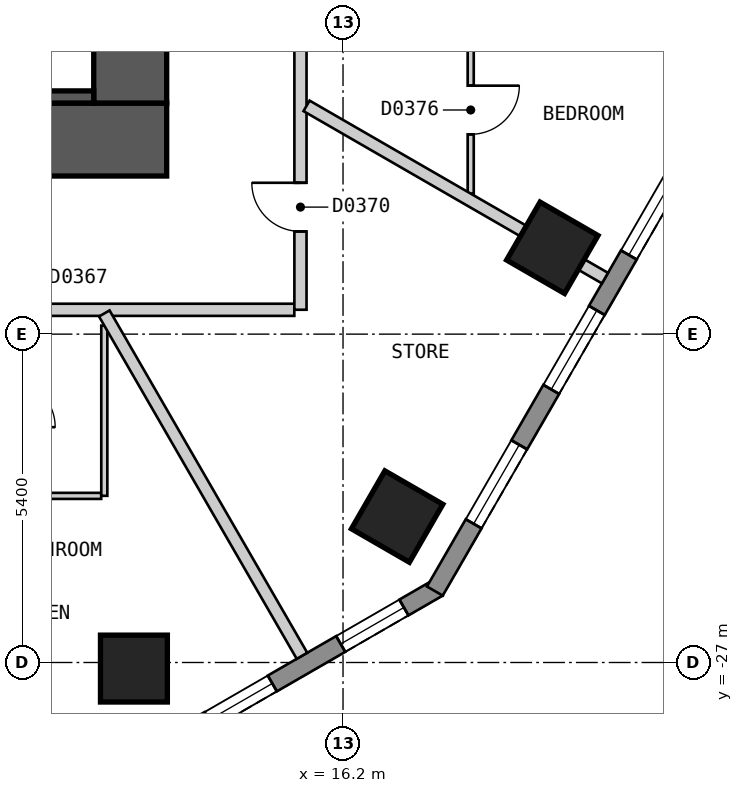
"""IFC4 building model, lengths in metres.
Left out: names, types, materials, properties, quantities, classifications, styles, units other than length and angle.
Written with IfcOpenShell. Run it as: python <this file> out.ifc"""

import sys

from ifc_helpers import new_model, si_unit, direction, frame, frame_2d, origin, origin_2d, place, context, subcontext, project, spatial, polyline, rectangle, outline, extrude, element, fill, save


model = new_model("IFC4")
c1 = context("Model", 3, precision=1e-05, world=origin(), true_north=direction((0.0, 1.0)))
c2 = subcontext(c1, "Body", "Model", "MODEL_VIEW")
j1 = project(units=[si_unit("LENGTHUNIT", "METRE"), si_unit("PLANEANGLEUNIT", "RADIAN")], contexts=[c1])
p1 = place(None, origin())
s1 = spatial("IfcSite", under=j1, at=p1, CompositionType="ELEMENT")
p2 = place(p1, origin())
s2 = spatial("IfcBuilding", under=s1, at=p2, CompositionType="ELEMENT")
p3 = place(p2, frame((0.0, 0.0, 59.4)))
s3 = spatial("IfcBuildingStorey", under=s2, at=p3, CompositionType="ELEMENT", Elevation=59.4)
for number, where, z_axis, x_axis in (
    (1, (12.761, -27.1, 0.0), (0.0, 0.0, 1.0), (1.0, 0.0, 0.0)),
    (2, (17.09, -24.6, 0.0), (0.0, 0.0, 1.0), (0.5, 0.866, 0.0)),
    (3, (19.642, -20.18, 0.0), (0.0, 0.0, 1.0), (0.5, 0.866, 0.0)),
):
    element("IfcColumn", number, at=place(p3, frame(where, z_axis=z_axis, x_axis=x_axis)), inside=s3, PredefinedType="COLUMN", context=c2, shape_type="SweptSolid", body=[
        extrude(rectangle(XDim=1.1, YDim=1.1, at=origin_2d()), origin(), (0.0, 0.0, 1.0), 3.0),
    ])
p4 = place(p3, frame((-13.3, -18.4, 0.0), z_axis=(0.0, 0.0, 1.0), x_axis=(1.0, 0.0, 0.0)))
e4 = element("IfcWall", 4, at=p4, inside=s3, PredefinedType="SHEAR", context=c2, shape_type="SweptSolid", body=[
    extrude(rectangle(XDim=26.6, YDim=1.2, at=frame_2d((13.3, 0.0))), origin(), (0.0, 0.0, 1.0), 2.6),
])
p5 = place(p3, frame((12.7, -17.8, 0.0), z_axis=(0.0, 0.0, 1.0), x_axis=(0.0, 1.0, 0.0)))
e5 = element("IfcWall", 5, at=p5, inside=s3, PredefinedType="SHEAR", context=c2, shape_type="SweptSolid", body=[
    extrude(rectangle(XDim=11.6, YDim=1.2, at=frame_2d((5.8, 0.0))), origin(), (0.0, 0.0, 1.0), 2.6),
])
p6 = place(p3, frame((13.435, -28.27, 0.0), z_axis=(0.0, 0.0, 1.0), x_axis=(0.866010750942, 0.50002537861, 0.0)))
e6 = element("IfcWall", 6, at=p6, inside=s3, PredefinedType="SOLIDWALL", context=c2, shape_type="SweptSolid", body=[
    extrude(outline(polyline([(0.0, -0.15), (5.0, -0.15), (4.919, 0.15), (0.08, 0.15), (0.0, -0.15)])), origin(), (0.0, 0.0, 1.0), 2.6),
])
p7 = place(p6, frame((0.65, 0.0, 0.15)))
e7 = element("IfcOpeningElement", 7, at=p7, cuts=e6, PredefinedType="OPENING", context=c2, shape_type="SweptSolid", body=[
    extrude(rectangle(XDim=1.2, YDim=2.1, at=frame_2d((0.6, 1.05))), frame((0.0, 0.16, 0.0), z_axis=(0.0, -1.0, 0.0), x_axis=(1.0, 0.0, 0.0)), (0.0, 0.0, 1.0), 0.32),
])
p8 = place(p6, frame((3.149, 0.0, 0.15)))
e8 = element("IfcOpeningElement", 8, at=p8, cuts=e6, PredefinedType="OPENING", context=c2, shape_type="SweptSolid", body=[
    extrude(rectangle(XDim=1.2, YDim=2.1, at=frame_2d((0.6, 1.05))), frame((0.0, 0.16, 0.0), z_axis=(0.0, -1.0, 0.0), x_axis=(1.0, 0.0, 0.0)), (0.0, 0.0, 1.0), 0.32),
])
p9 = place(p3, frame((17.71, -25.825, 0.0), z_axis=(0.0, 0.0, 1.0), x_axis=(0.500001938803, 0.866024284413, 0.0)))
e9 = element("IfcWall", 9, at=p9, inside=s3, PredefinedType="SOLIDWALL", context=c2, shape_type="SweptSolid", body=[
    extrude(outline(polyline([(0.0, -0.15), (27.02, -0.15), (26.94, 0.15), (0.08, 0.15), (0.0, -0.15)])), origin(), (0.0, 0.0, 1.0), 2.6),
])
p10 = place(p9, frame((1.277, 0.0, 0.15)))
e10 = element("IfcOpeningElement", 10, at=p10, cuts=e9, PredefinedType="OPENING", context=c2, shape_type="SweptSolid", body=[
    extrude(rectangle(XDim=1.5, YDim=2.1, at=frame_2d((0.75, 1.05))), frame((0.0, 0.16, 0.0), z_axis=(0.0, -1.0, 0.0), x_axis=(1.0, 0.0, 0.0)), (0.0, 0.0, 1.0), 0.32),
])
p11 = place(p9, frame((3.829, 0.0, 0.15)))
e11 = element("IfcOpeningElement", 11, at=p11, cuts=e9, PredefinedType="OPENING", context=c2, shape_type="SweptSolid", body=[
    extrude(rectangle(XDim=1.5, YDim=2.1, at=frame_2d((0.75, 1.05))), frame((0.0, 0.16, 0.0), z_axis=(0.0, -1.0, 0.0), x_axis=(1.0, 0.0, 0.0)), (0.0, 0.0, 1.0), 0.32),
])
p12 = place(p9, frame((6.382, 0.0, 0.15)))
e12 = element("IfcOpeningElement", 12, at=p12, cuts=e9, PredefinedType="OPENING", context=c2, shape_type="SweptSolid", body=[
    extrude(rectangle(XDim=1.5, YDim=2.1, at=frame_2d((0.75, 1.05))), frame((0.0, 0.16, 0.0), z_axis=(0.0, -1.0, 0.0), x_axis=(1.0, 0.0, 0.0)), (0.0, 0.0, 1.0), 0.32),
])
p13 = place(p9, frame((8.933, 0.0, 0.15)))
e13 = element("IfcOpeningElement", 13, at=p13, cuts=e9, PredefinedType="OPENING", context=c2, shape_type="SweptSolid", body=[
    extrude(rectangle(XDim=1.5, YDim=2.1, at=frame_2d((0.75, 1.05))), frame((0.0, 0.16, 0.0), z_axis=(0.0, -1.0, 0.0), x_axis=(1.0, 0.0, 0.0)), (0.0, 0.0, 1.0), 0.32),
])
p14 = place(p9, frame((11.485, 0.0, 0.15)))
e14 = element("IfcOpeningElement", 14, at=p14, cuts=e9, PredefinedType="OPENING", context=c2, shape_type="SweptSolid", body=[
    extrude(rectangle(XDim=1.5, YDim=2.1, at=frame_2d((0.75, 1.05))), frame((0.0, 0.16, 0.0), z_axis=(0.0, -1.0, 0.0), x_axis=(1.0, 0.0, 0.0)), (0.0, 0.0, 1.0), 0.32),
])
p15 = place(p9, frame((14.037, 0.0, 0.15)))
e15 = element("IfcOpeningElement", 15, at=p15, cuts=e9, PredefinedType="OPENING", context=c2, shape_type="SweptSolid", body=[
    extrude(rectangle(XDim=1.5, YDim=2.1, at=frame_2d((0.75, 1.05))), frame((0.0, 0.16, 0.0), z_axis=(0.0, -1.0, 0.0), x_axis=(1.0, 0.0, 0.0)), (0.0, 0.0, 1.0), 0.32),
])
p16 = place(p9, frame((16.589, 0.0, 0.15)))
e16 = element("IfcOpeningElement", 16, at=p16, cuts=e9, PredefinedType="OPENING", context=c2, shape_type="SweptSolid", body=[
    extrude(rectangle(XDim=1.5, YDim=2.1, at=frame_2d((0.75, 1.05))), frame((0.0, 0.16, 0.0), z_axis=(0.0, -1.0, 0.0), x_axis=(1.0, 0.0, 0.0)), (0.0, 0.0, 1.0), 0.32),
])
p17 = place(p9, frame((19.141, 0.0, 0.15)))
e17 = element("IfcOpeningElement", 17, at=p17, cuts=e9, PredefinedType="OPENING", context=c2, shape_type="SweptSolid", body=[
    extrude(rectangle(XDim=1.5, YDim=2.1, at=frame_2d((0.75, 1.05))), frame((0.0, 0.16, 0.0), z_axis=(0.0, -1.0, 0.0), x_axis=(1.0, 0.0, 0.0)), (0.0, 0.0, 1.0), 0.32),
])
p18 = place(p9, frame((21.693, 0.0, 0.15)))
e18 = element("IfcOpeningElement", 18, at=p18, cuts=e9, PredefinedType="OPENING", context=c2, shape_type="SweptSolid", body=[
    extrude(rectangle(XDim=1.5, YDim=2.1, at=frame_2d((0.75, 1.05))), frame((0.0, 0.16, 0.0), z_axis=(0.0, -1.0, 0.0), x_axis=(1.0, 0.0, 0.0)), (0.0, 0.0, 1.0), 0.32),
])
p19 = place(p9, frame((24.244, 0.0, 0.15)))
e19 = element("IfcOpeningElement", 19, at=p19, cuts=e9, PredefinedType="OPENING", context=c2, shape_type="SweptSolid", body=[
    extrude(rectangle(XDim=1.5, YDim=2.1, at=frame_2d((0.75, 1.05))), frame((0.0, 0.16, 0.0), z_axis=(0.0, -1.0, 0.0), x_axis=(1.0, 0.0, 0.0)), (0.0, 0.0, 1.0), 0.32),
])
p20 = place(p3, frame((-15.4, -21.2, 0.0), z_axis=(0.0, 0.0, 1.0), x_axis=(1.0, 0.0, 0.0)))
e20 = element("IfcWall", 20, at=p20, inside=s3, PredefinedType="PARTITIONING", context=c2, shape_type="SweptSolid", body=[
    extrude(rectangle(XDim=30.799, YDim=0.2, at=frame_2d((15.399, 0.0))), origin(), (0.0, 0.0, 1.0), 2.6),
])
p21 = place(p20, frame((9.797, 0.0, 0.0)))
e21 = element("IfcOpeningElement", 21, at=p21, cuts=e20, PredefinedType="OPENING", context=c2, shape_type="SweptSolid", body=[
    extrude(rectangle(XDim=1.0, YDim=2.1, at=frame_2d((0.5, 1.05))), frame((0.0, 0.11, 0.0), z_axis=(0.0, -1.0, 0.0), x_axis=(1.0, 0.0, 0.0)), (0.0, 0.0, 1.0), 0.22),
])
p22 = place(p20, frame((14.901, 0.0, 0.0)))
e22 = element("IfcOpeningElement", 22, at=p22, cuts=e20, PredefinedType="OPENING", context=c2, shape_type="SweptSolid", body=[
    extrude(rectangle(XDim=1.0, YDim=2.1, at=frame_2d((0.5, 1.05))), frame((0.0, 0.11, 0.0), z_axis=(0.0, -1.0, 0.0), x_axis=(1.0, 0.0, 0.0)), (0.0, 0.0, 1.0), 0.22),
])
p23 = place(p20, frame((24.916, 0.0, 0.0)))
e23 = element("IfcOpeningElement", 23, at=p23, cuts=e20, PredefinedType="OPENING", context=c2, shape_type="SweptSolid", body=[
    extrude(rectangle(XDim=0.9, YDim=2.1, at=frame_2d((0.45, 1.05))), frame((0.0, 0.11, 0.0), z_axis=(0.0, -1.0, 0.0), x_axis=(1.0, 0.0, 0.0)), (0.0, 0.0, 1.0), 0.22),
])
p24 = place(p3, frame((15.5, -21.199, 0.0), z_axis=(0.0, 0.0, 1.0), x_axis=(0.0, 1.0, 0.0)))
e24 = element("IfcWall", 24, at=p24, inside=s3, PredefinedType="PARTITIONING", context=c2, shape_type="SweptSolid", body=[
    extrude(rectangle(XDim=7.575, YDim=0.2, at=frame_2d((3.788, 0.0))), origin(), (0.0, 0.0, 1.0), 2.6),
])
p25 = place(p24, frame((1.288, 0.0, 0.0)))
e25 = element("IfcOpeningElement", 25, at=p25, cuts=e24, PredefinedType="OPENING", context=c2, shape_type="SweptSolid", body=[
    extrude(rectangle(XDim=0.8, YDim=2.1, at=frame_2d((0.4, 1.05))), frame((0.0, 0.11, 0.0), z_axis=(0.0, -1.0, 0.0), x_axis=(1.0, 0.0, 0.0)), (0.0, 0.0, 1.0), 0.22),
])
p26 = place(p3, frame((9.267, -24.26, 0.0), z_axis=(0.0, 0.0, 1.0), x_axis=(1.0, 0.0, 0.0)))
e26 = element("IfcWall", 26, at=p26, inside=s3, PredefinedType="PARTITIONING", context=c2, shape_type="SweptSolid", body=[
    extrude(rectangle(XDim=2.956, YDim=0.1, at=frame_2d((1.478, 0.0))), origin(), (0.0, 0.0, 1.0), 2.6),
])
p27 = place(p3, frame((12.274, -24.259, 0.0), z_axis=(0.0, 0.0, 1.0), x_axis=(0.0, 1.0, 0.0)))
e27 = element("IfcWall", 27, at=p27, inside=s3, PredefinedType="PARTITIONING", context=c2, shape_type="SweptSolid", body=[
    extrude(rectangle(XDim=2.799, YDim=0.1, at=frame_2d((1.399, 0.0))), origin(), (0.0, 0.0, 1.0), 2.6),
])
p28 = place(p3, frame((18.3, -19.289, 0.0), z_axis=(0.0, 0.0, 1.0), x_axis=(0.0, 1.0, 0.0)))
e28 = element("IfcWall", 28, at=p28, inside=s3, PredefinedType="PARTITIONING", context=c2, shape_type="SweptSolid", body=[
    extrude(rectangle(XDim=2.865, YDim=0.1, at=frame_2d((1.433, 0.0))), origin(), (0.0, 0.0, 1.0), 2.6),
])
p29 = place(p28, frame((0.975, 0.0, 0.0)))
e29 = element("IfcOpeningElement", 29, at=p29, cuts=e28, PredefinedType="OPENING", context=c2, shape_type="SweptSolid", body=[
    extrude(rectangle(XDim=0.8, YDim=2.1, at=frame_2d((0.4, 1.05))), frame((0.0, 0.06, 0.0), z_axis=(0.0, -1.0, 0.0), x_axis=(1.0, 0.0, 0.0)), (0.0, 0.0, 1.0), 0.12),
])
p30 = place(p3, frame((12.274, -21.26, 0.0), z_axis=(0.0, 0.0, 1.0), x_axis=(0.500064857354, -0.865987955135, 0.0)))
e30 = element("IfcWall", 30, at=p30, inside=s3, PredefinedType="PARTITIONING", context=c2, shape_type="SweptSolid", body=[
    extrude(rectangle(XDim=6.501, YDim=0.2, at=frame_2d((3.25, 0.0))), origin(), (0.0, 0.0, 1.0), 2.6),
])
p31 = place(p3, frame((15.6, -17.846, 0.0), z_axis=(0.0, 0.0, 1.0), x_axis=(0.866071523686, -0.499920109479, 0.0)))
e31 = element("IfcWall", 31, at=p31, inside=s3, PredefinedType="PARTITIONING", context=c2, shape_type="SweptSolid", body=[
    extrude(rectangle(XDim=5.667, YDim=0.2, at=frame_2d((2.833, 0.0))), origin(), (0.0, 0.0, 1.0), 2.6),
])
p32 = place(p3, frame((6.7, -17.7, 0.0), z_axis=(0.0, 0.0, 1.0), x_axis=(1.0, 0.0, 0.0)))
e32 = element("IfcWall", 32, at=p32, inside=s3, PredefinedType="SOLIDWALL", context=c2, shape_type="SweptSolid", body=[
    extrude(rectangle(XDim=5.4, YDim=0.2, at=frame_2d((2.7, 0.0))), origin(), (0.0, 0.0, 1.0), 2.6),
])
p33 = place(p7, origin())
e33 = element("IfcWindow", 33, at=p33, inside=s3, PartitioningType="SINGLE_PANEL", PredefinedType="WINDOW", context=c2, shape_type="SweptSolid", body=[
    extrude(rectangle(XDim=1.2, YDim=2.1, at=frame_2d((0.6, 1.05))), frame((0.0, 0.03, 0.0), z_axis=(0.0, -1.0, 0.0), x_axis=(1.0, 0.0, 0.0)), (0.0, 0.0, 1.0), 0.06),
])
fill(e7, e33)
p34 = place(p8, origin())
e34 = element("IfcWindow", 34, at=p34, inside=s3, PartitioningType="SINGLE_PANEL", PredefinedType="WINDOW", context=c2, shape_type="SweptSolid", body=[
    extrude(rectangle(XDim=1.2, YDim=2.1, at=frame_2d((0.6, 1.05))), frame((0.0, 0.03, 0.0), z_axis=(0.0, -1.0, 0.0), x_axis=(1.0, 0.0, 0.0)), (0.0, 0.0, 1.0), 0.06),
])
fill(e8, e34)
p35 = place(p10, origin())
e35 = element("IfcWindow", 35, at=p35, inside=s3, PartitioningType="SINGLE_PANEL", PredefinedType="WINDOW", context=c2, shape_type="SweptSolid", body=[
    extrude(rectangle(XDim=1.5, YDim=2.1, at=frame_2d((0.75, 1.05))), frame((0.0, 0.03, 0.0), z_axis=(0.0, -1.0, 0.0), x_axis=(1.0, 0.0, 0.0)), (0.0, 0.0, 1.0), 0.06),
])
fill(e10, e35)
p36 = place(p11, origin())
e36 = element("IfcWindow", 36, at=p36, inside=s3, PartitioningType="SINGLE_PANEL", PredefinedType="WINDOW", context=c2, shape_type="SweptSolid", body=[
    extrude(rectangle(XDim=1.5, YDim=2.1, at=frame_2d((0.75, 1.05))), frame((0.0, 0.03, 0.0), z_axis=(0.0, -1.0, 0.0), x_axis=(1.0, 0.0, 0.0)), (0.0, 0.0, 1.0), 0.06),
])
fill(e11, e36)
p37 = place(p12, origin())
e37 = element("IfcWindow", 37, at=p37, inside=s3, PartitioningType="SINGLE_PANEL", PredefinedType="WINDOW", context=c2, shape_type="SweptSolid", body=[
    extrude(rectangle(XDim=1.5, YDim=2.1, at=frame_2d((0.75, 1.05))), frame((0.0, 0.03, 0.0), z_axis=(0.0, -1.0, 0.0), x_axis=(1.0, 0.0, 0.0)), (0.0, 0.0, 1.0), 0.06),
])
fill(e12, e37)
p38 = place(p25, origin())
e38 = element("IfcDoor", 38, at=p38, inside=s3, OperationType="SINGLE_SWING_RIGHT", PredefinedType="DOOR", context=c2, shape_type="SweptSolid", body=[
    extrude(rectangle(XDim=0.8, YDim=2.1, at=frame_2d((0.4, 1.05))), frame((0.0, 0.025, 0.0), z_axis=(0.0, -1.0, 0.0), x_axis=(1.0, 0.0, 0.0)), (0.0, 0.0, 1.0), 0.05),
])
fill(e25, e38)
p39 = place(p29, origin())
e39 = element("IfcDoor", 39, at=p39, inside=s3, OperationType="SINGLE_SWING_RIGHT", PredefinedType="DOOR", context=c2, shape_type="SweptSolid", body=[
    extrude(rectangle(XDim=0.8, YDim=2.1, at=frame_2d((0.4, 1.05))), frame((0.0, 0.025, 0.0), z_axis=(0.0, -1.0, 0.0), x_axis=(1.0, 0.0, 0.0)), (0.0, 0.0, 1.0), 0.05),
])
fill(e29, e39)
save(model, sys.argv[1])
